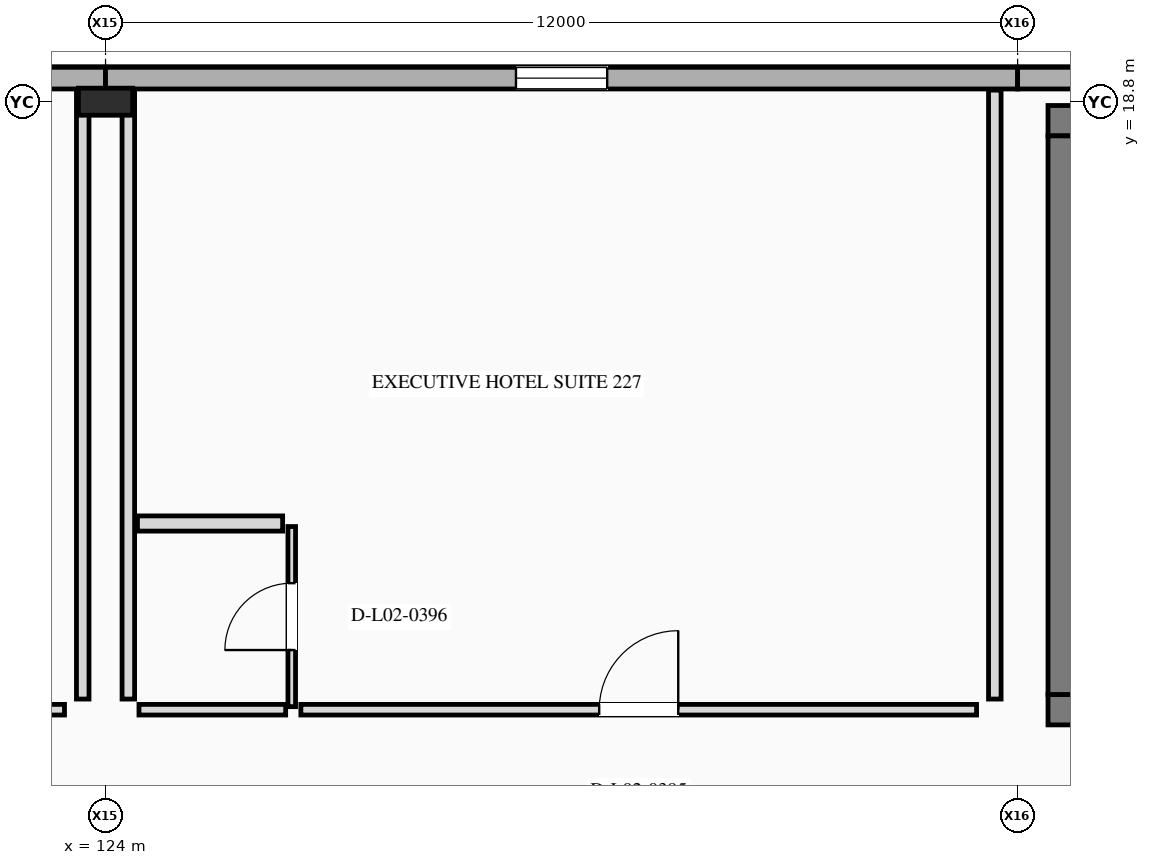
"""IFC4 building model, lengths in metres.
Left out: names, types, materials, properties, quantities, classifications, styles, units other than length and angle.
Written with IfcOpenShell. Run it as: python <this file> out.ifc"""

import sys

from ifc_helpers import new_model, si_unit, direction, frame, frame_2d, origin, origin_2d, place, context, subcontext, project, spatial, rectangle, i_section, extrude, element, fill, save


model = new_model("IFC4")
c1 = context("Model", 3, precision=1e-05, world=origin(), true_north=direction((0.0, 1.0)))
c2 = subcontext(c1, "Body", "Model", "MODEL_VIEW")
j1 = project(units=[si_unit("LENGTHUNIT", "METRE"), si_unit("PLANEANGLEUNIT", "RADIAN")], contexts=[c1])
p1 = place(None, origin())
s1 = spatial("IfcSite", under=j1, at=p1, CompositionType="ELEMENT")
p2 = place(p1, origin())
s2 = spatial("IfcBuilding", under=s1, at=p2, CompositionType="ELEMENT")
p3 = place(p2, frame((0.0, 0.0, 10.8)))
s3 = spatial("IfcBuildingStorey", under=s2, at=p3, CompositionType="ELEMENT", Elevation=10.8)
p4 = place(p3, frame((124.0, 18.8, 0.0), z_axis=(0.0, 0.0, 1.0), x_axis=(0.0, 1.0, 0.0)))
e1 = element("IfcColumn", 1, at=p4, inside=s3, PredefinedType="COLUMN", context=c2, shape_type="SweptSolid", body=[
    extrude(i_section(OverallWidth=0.356, OverallDepth=0.714, WebThickness=0.019, FlangeThickness=0.034, at=origin_2d()), origin(), (0.0, 0.0, 1.0), 4.8),
])
p5 = place(p3, frame((124.0, 19.11, 0.0), z_axis=(0.0, 0.0, 1.0), x_axis=(-1.0, 0.0, 0.0)))
e2 = element("IfcWall", 2, at=p5, inside=s3, PredefinedType="STANDARD", context=c2, shape_type="SweptSolid", body=[
    extrude(rectangle(XDim=12.0, YDim=0.285, at=frame_2d((6.0, 0.0))), origin(), (0.0, 0.0, 1.0), 4.8),
])
p6 = place(p5, frame((5.325, 0.0, 0.85)))
e3 = element("IfcOpeningElement", 3, at=p6, cuts=e2, PredefinedType="OPENING", context=c2, shape_type="SweptSolid", body=[
    extrude(rectangle(XDim=1.35, YDim=1.65, at=frame_2d((0.675, 0.825))), frame((0.0, 0.152, 0.0), z_axis=(0.0, -1.0, 0.0), x_axis=(1.0, 0.0, 0.0)), (0.0, 0.0, 1.0), 0.305),
])
p7 = place(p3, frame((136.0, 19.11, 0.0), z_axis=(0.0, 0.0, 1.0), x_axis=(-1.0, 0.0, 0.0)))
e4 = element("IfcWall", 4, at=p7, inside=s3, PredefinedType="STANDARD", context=c2, shape_type="SweptSolid", body=[
    extrude(rectangle(XDim=12.0, YDim=0.285, at=frame_2d((6.0, 0.0))), origin(), (0.0, 0.0, 1.0), 4.8),
])
p8 = place(p7, frame((5.4, 0.0, 0.85)))
e5 = element("IfcOpeningElement", 5, at=p8, cuts=e4, PredefinedType="OPENING", context=c2, shape_type="SweptSolid", body=[
    extrude(rectangle(XDim=1.2, YDim=1.6, at=frame_2d((0.6, 0.8))), frame((0.0, 0.152, 0.0), z_axis=(0.0, -1.0, 0.0), x_axis=(1.0, 0.0, 0.0)), (0.0, 0.0, 1.0), 0.305),
])
p9 = place(p3, frame((147.03, 19.11, 0.0), z_axis=(0.0, 0.0, 1.0), x_axis=(-1.0, 0.0, 0.0)))
e6 = element("IfcWall", 6, at=p9, inside=s3, PredefinedType="STANDARD", context=c2, shape_type="SweptSolid", body=[
    extrude(rectangle(XDim=11.03, YDim=0.285, at=frame_2d((5.515, 0.0))), origin(), (0.0, 0.0, 1.0), 4.8),
])
p10 = place(p3, frame((136.4, 10.8, 0.0), z_axis=(0.0, 0.0, 1.0), x_axis=(1.0, 0.0, 0.0)))
e7 = element("IfcWall", 7, at=p10, inside=s3, PredefinedType="SHEAR", context=c2, shape_type="SweptSolid", body=[
    extrude(rectangle(XDim=10.6, YDim=0.4, at=frame_2d((5.3, 0.0))), origin(), (0.0, 0.0, 1.0), 4.8),
])
p11 = place(p10, frame((1.25, 0.0, 0.0)))
e8 = element("IfcOpeningElement", 8, at=p11, cuts=e7, PredefinedType="OPENING", context=c2, shape_type="SweptSolid", body=[
    extrude(rectangle(XDim=1.1, YDim=2.2, at=frame_2d((0.55, 1.1))), frame((0.0, 0.21, 0.0), z_axis=(0.0, -1.0, 0.0), x_axis=(1.0, 0.0, 0.0)), (0.0, 0.0, 1.0), 0.42),
])
p12 = place(p10, frame((4.15, 0.0, 0.0)))
e9 = element("IfcOpeningElement", 9, at=p12, cuts=e7, PredefinedType="OPENING", context=c2, shape_type="SweptSolid", body=[
    extrude(rectangle(XDim=1.1, YDim=2.2, at=frame_2d((0.55, 1.1))), frame((0.0, 0.21, 0.0), z_axis=(0.0, -1.0, 0.0), x_axis=(1.0, 0.0, 0.0)), (0.0, 0.0, 1.0), 0.42),
])
p13 = place(p3, frame((147.0, 18.55, 0.0), z_axis=(0.0, 0.0, 1.0), x_axis=(-1.0, 0.0, 0.0)))
e10 = element("IfcWall", 10, at=p13, inside=s3, PredefinedType="SHEAR", context=c2, shape_type="SweptSolid", body=[
    extrude(rectangle(XDim=10.6, YDim=0.4, at=frame_2d((5.3, 0.0))), origin(), (0.0, 0.0, 1.0), 4.8),
])
p14 = place(p3, frame((136.6, 18.35, 0.0), z_axis=(0.0, 0.0, 1.0), x_axis=(0.0, -1.0, 0.0)))
e11 = element("IfcWall", 11, at=p14, inside=s3, PredefinedType="SHEAR", context=c2, shape_type="SweptSolid", body=[
    extrude(rectangle(XDim=7.35, YDim=0.4, at=frame_2d((3.675, 0.0))), origin(), (0.0, 0.0, 1.0), 4.8),
])
p15 = place(p3, frame((114.57, 10.8, 0.0), z_axis=(0.0, 0.0, 1.0), x_axis=(1.0, 0.0, 0.0)))
e12 = element("IfcWall", 12, at=p15, inside=s3, PredefinedType="PARTITIONING", context=c2, shape_type="SweptSolid", body=[
    extrude(rectangle(XDim=8.89, YDim=0.14, at=frame_2d((4.445, 0.0))), origin(), (0.0, 0.0, 1.0), 4.475),
])
p16 = place(p15, frame((3.955, 0.0, 0.0)))
e13 = element("IfcOpeningElement", 13, at=p16, cuts=e12, PredefinedType="OPENING", context=c2, shape_type="SweptSolid", body=[
    extrude(rectangle(XDim=0.98, YDim=2.2, at=frame_2d((0.49, 1.1))), frame((0.0, 0.08, 0.0), z_axis=(0.0, -1.0, 0.0), x_axis=(1.0, 0.0, 0.0)), (0.0, 0.0, 1.0), 0.16),
])
p17 = place(p3, frame((123.7, 10.94, 0.0), z_axis=(0.0, 0.0, 1.0), x_axis=(0.0, 1.0, 0.0)))
e14 = element("IfcWall", 14, at=p17, inside=s3, PredefinedType="PARTITIONING", context=c2, shape_type="SweptSolid", body=[
    extrude(rectangle(XDim=8.012, YDim=0.165, at=frame_2d((4.006, 0.0))), origin(), (0.0, 0.0, 1.0), 3.713),
])
p18 = place(p3, frame((124.44, 10.8, 0.0), z_axis=(0.0, 0.0, 1.0), x_axis=(1.0, 0.0, 0.0)))
e15 = element("IfcWall", 15, at=p18, inside=s3, PredefinedType="PARTITIONING", context=c2, shape_type="SweptSolid", body=[
    extrude(rectangle(XDim=1.93, YDim=0.14, at=frame_2d((0.965, 0.0))), origin(), (0.0, 0.0, 1.0), 4.475),
])
p19 = place(p3, frame((126.57, 10.8, 0.0), z_axis=(0.0, 0.0, 1.0), x_axis=(1.0, 0.0, 0.0)))
e16 = element("IfcWall", 16, at=p19, inside=s3, PredefinedType="PARTITIONING", context=c2, shape_type="SweptSolid", body=[
    extrude(rectangle(XDim=8.89, YDim=0.14, at=frame_2d((4.445, 0.0))), origin(), (0.0, 0.0, 1.0), 4.475),
])
p20 = place(p19, frame((3.925, 0.0, 0.0)))
e17 = element("IfcOpeningElement", 17, at=p20, cuts=e16, PredefinedType="OPENING", context=c2, shape_type="SweptSolid", body=[
    extrude(rectangle(XDim=1.04, YDim=2.25, at=frame_2d((0.52, 1.125))), frame((0.0, 0.08, 0.0), z_axis=(0.0, -1.0, 0.0), x_axis=(1.0, 0.0, 0.0)), (0.0, 0.0, 1.0), 0.16),
])
p21 = place(p3, frame((124.3, 10.94, 0.0), z_axis=(0.0, 0.0, 1.0), x_axis=(0.0, 1.0, 0.0)))
e18 = element("IfcWall", 18, at=p21, inside=s3, PredefinedType="PARTITIONING", context=c2, shape_type="SweptSolid", body=[
    extrude(rectangle(XDim=8.012, YDim=0.165, at=frame_2d((4.006, 0.0))), origin(), (0.0, 0.0, 1.0), 3.804),
])
p22 = place(p3, frame((135.7, 10.94, 0.0), z_axis=(0.0, 0.0, 1.0), x_axis=(0.0, 1.0, 0.0)))
e19 = element("IfcWall", 19, at=p22, inside=s3, PredefinedType="PARTITIONING", context=c2, shape_type="SweptSolid", body=[
    extrude(rectangle(XDim=8.012, YDim=0.165, at=frame_2d((4.006, 0.0))), origin(), (0.0, 0.0, 1.0), 4.475),
])
p23 = place(p3, frame((126.45, 10.84, 0.0), z_axis=(0.0, 0.0, 1.0), x_axis=(0.0, 1.0, 0.0)))
e20 = element("IfcWall", 20, at=p23, inside=s3, PredefinedType="PARTITIONING", context=c2, shape_type="SweptSolid", body=[
    extrude(rectangle(XDim=2.37, YDim=0.1, at=frame_2d((1.185, 0.0))), origin(), (0.0, 0.0, 1.0), 4.475),
])
p24 = place(p23, frame((0.745, 0.0, 0.0)))
e21 = element("IfcOpeningElement", 21, at=p24, cuts=e20, PredefinedType="OPENING", context=c2, shape_type="SweptSolid", body=[
    extrude(rectangle(XDim=0.88, YDim=2.18, at=frame_2d((0.44, 1.09))), frame((0.0, 0.06, 0.0), z_axis=(0.0, -1.0, 0.0), x_axis=(1.0, 0.0, 0.0)), (0.0, 0.0, 1.0), 0.12),
])
p25 = place(p3, frame((124.42, 13.25, 0.0), z_axis=(0.0, 0.0, 1.0), x_axis=(1.0, 0.0, 0.0)))
e22 = element("IfcWall", 22, at=p25, inside=s3, PredefinedType="PLUMBINGWALL", context=c2, shape_type="SweptSolid", body=[
    extrude(rectangle(XDim=1.91, YDim=0.2, at=frame_2d((0.955, 0.0))), origin(), (0.0, 0.0, 1.0), 4.475),
])
p26 = place(p8, origin())
e23 = element("IfcWindow", 23, at=p26, inside=s3, PartitioningType="SINGLE_PANEL", PredefinedType="WINDOW", context=c2, shape_type="SweptSolid", body=[
    extrude(rectangle(XDim=1.2, YDim=1.6, at=frame_2d((0.6, 0.8))), frame((0.0, 0.03, 0.0), z_axis=(0.0, -1.0, 0.0), x_axis=(1.0, 0.0, 0.0)), (0.0, 0.0, 1.0), 0.06),
])
fill(e5, e23)
p27 = place(p20, origin())
e24 = element("IfcDoor", 24, at=p27, inside=s3, OperationType="SINGLE_SWING_RIGHT", PredefinedType="DOOR", context=c2, shape_type="SweptSolid", body=[
    extrude(rectangle(XDim=1.04, YDim=2.25, at=frame_2d((0.52, 1.125))), frame((0.0, 0.025, 0.0), z_axis=(0.0, -1.0, 0.0), x_axis=(1.0, 0.0, 0.0)), (0.0, 0.0, 1.0), 0.05),
])
fill(e17, e24)
p28 = place(p24, origin())
e25 = element("IfcDoor", 25, at=p28, inside=s3, OperationType="SINGLE_SWING_LEFT", PredefinedType="DOOR", context=c2, shape_type="SweptSolid", body=[
    extrude(rectangle(XDim=0.88, YDim=2.18, at=frame_2d((0.44, 1.09))), frame((0.0, 0.025, 0.0), z_axis=(0.0, -1.0, 0.0), x_axis=(1.0, 0.0, 0.0)), (0.0, 0.0, 1.0), 0.05),
])
fill(e21, e25)
save(model, sys.argv[1])
